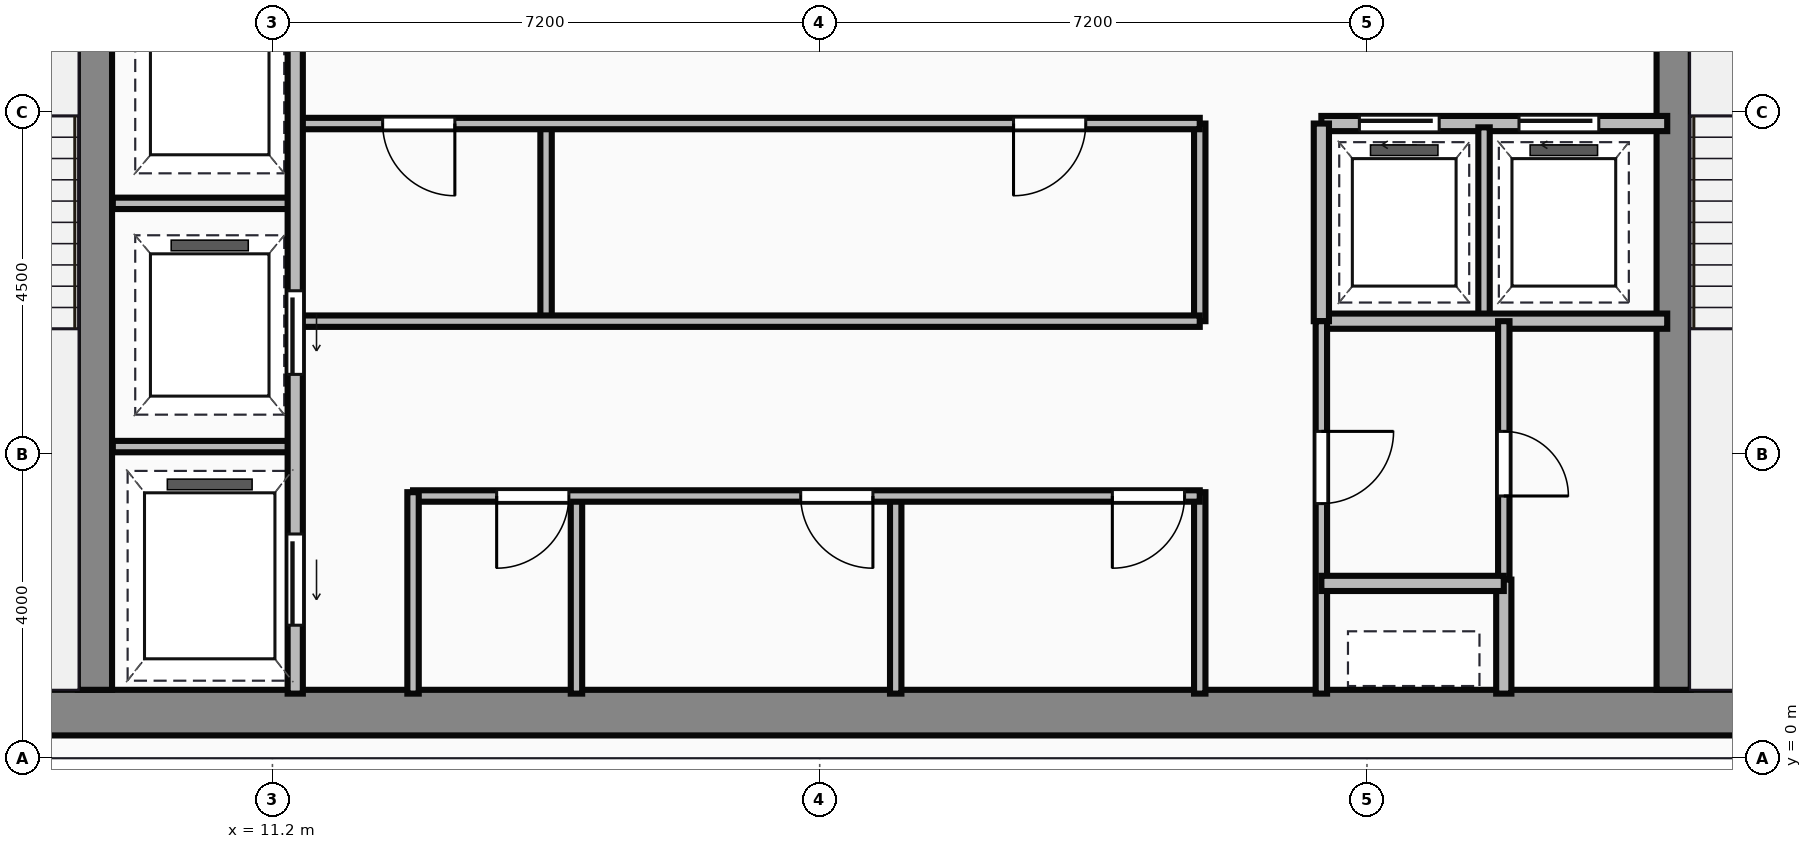
"""IFC4 building model, lengths in metres.
Left out: names, types, materials, properties, quantities, classifications, styles, units other than length and angle.
Written with IfcOpenShell. Run it as: python <this file> out.ifc"""

import sys

from ifc_helpers import new_model, si_unit, direction, frame, frame_2d, origin, place, context, subcontext, project, spatial, rectangle, extrude, source, transform, mapped, element, fill, save


model = new_model("IFC4")
c1 = context("Model", 3, precision=1e-05, world=origin(), true_north=direction((0.0, 1.0)))
c2 = subcontext(c1, "Body", "Model", "MODEL_VIEW")
j1 = project(units=[si_unit("LENGTHUNIT", "METRE"), si_unit("PLANEANGLEUNIT", "RADIAN")], contexts=[c1])
p1 = place(None, origin())
s1 = spatial("IfcSite", under=j1, at=p1, CompositionType="ELEMENT")
p2 = place(p1, origin())
s2 = spatial("IfcBuilding", under=s1, at=p2, CompositionType="ELEMENT")
p3 = place(p2, frame((0.0, 0.0, 192.25)))
s3 = spatial("IfcBuildingStorey", under=s2, at=p3, CompositionType="ELEMENT", Elevation=192.25)
m1 = source(origin(), c2, "Body", "SweptSolid", [
    extrude(rectangle(XDim=29.5, YDim=0.6, at=frame_2d((14.75, 0.0))), origin(), (0.0, 0.0, 1.0), 3.65),
])
p4 = place(p3, frame((4.5, 0.6, 0.0), z_axis=(0.0, 0.0, 1.0), x_axis=(1.0, 0.0, 0.0)))
e1 = element("IfcWall", 1, at=p4, inside=s3, PredefinedType="SHEAR", context=c2, shape_type="MappedRepresentation", body=[
    mapped(m1, transform((0.0, 0.0, 0.0))),
])
m2 = source(origin(), c2, "Body", "SweptSolid", [
    extrude(rectangle(XDim=12.5, YDim=0.45, at=frame_2d((6.25, 0.0))), origin(), (0.0, 0.0, 1.0), 3.65),
])
for number, where, z_axis, x_axis in (
    (2, (8.865, 0.9, 0.0), (0.0, 0.0, 1.0), (0.0, 1.0, 0.0)),
    (3, (29.635, 0.9, 0.0), (0.0, 0.0, 1.0), (0.0, 1.0, 0.0)),
):
    element("IfcWall", number, at=place(p3, frame(where, z_axis=z_axis, x_axis=x_axis)), inside=s3, PredefinedType="SHEAR", context=c2, shape_type="MappedRepresentation", body=[
        mapped(m2, transform((0.0, 0.0, 0.0))),
    ])
m3 = source(origin(), c2, "Body", "SweptSolid", [
    extrude(rectangle(XDim=9.6, YDim=0.2, at=frame_2d((4.8, 0.0))), origin(), (0.0, 0.0, 1.0), 3.4),
])
p5 = place(p3, frame((11.5, 0.85, 0.0), z_axis=(0.0, 0.0, 1.0), x_axis=(0.0, 1.0, 0.0)))
e4 = element("IfcWall", 4, at=p5, inside=s3, PredefinedType="PARTITIONING", context=c2, shape_type="MappedRepresentation", body=[
    mapped(m3, transform((0.0, 0.0, 0.0))),
])
p6 = place(p5, frame((4.2, 0.0, 0.0)))
e5 = element("IfcOpeningElement", 5, at=p6, cuts=e4, PredefinedType="OPENING", context=c2, shape_type="SweptSolid", body=[
    extrude(rectangle(XDim=1.1, YDim=2.15, at=frame_2d((0.55, 1.075))), frame((0.0, 0.11, 0.0), z_axis=(0.0, -1.0, 0.0), x_axis=(1.0, 0.0, 0.0)), (0.0, 0.0, 1.0), 0.22),
])
p7 = place(p5, frame((0.9, 0.0, 0.0)))
e6 = element("IfcOpeningElement", 6, at=p7, cuts=e4, PredefinedType="OPENING", context=c2, shape_type="SweptSolid", body=[
    extrude(rectangle(XDim=1.2, YDim=2.15, at=frame_2d((0.6, 1.075))), frame((0.0, 0.11, 0.0), z_axis=(0.0, -1.0, 0.0), x_axis=(1.0, 0.0, 0.0)), (0.0, 0.0, 1.0), 0.22),
])
m4 = source(origin(), c2, "Body", "SweptSolid", [
    extrude(rectangle(XDim=2.4, YDim=0.15, at=frame_2d((1.2, 0.0))), origin(), (0.0, 0.0, 1.0), 3.4),
])
for number, where, z_axis, x_axis in (
    (7, (9.1, 4.1, 0.0), (0.0, 0.0, 1.0), (1.0, 0.0, 0.0)),
    (8, (9.1, 7.3, 0.0), (0.0, 0.0, 1.0), (1.0, 0.0, 0.0)),
):
    element("IfcWall", number, at=place(p3, frame(where, z_axis=z_axis, x_axis=x_axis)), inside=s3, PredefinedType="PARTITIONING", context=c2, shape_type="MappedRepresentation", body=[
        mapped(m4, transform((0.0, 0.0, 0.0))),
    ])
m5 = source(origin(), c2, "Body", "SweptSolid", [
    extrude(rectangle(XDim=2.65, YDim=0.15, at=frame_2d((1.325, 0.0))), origin(), (0.0, 0.0, 1.0), 3.4),
])
p8 = place(p3, frame((13.05, 0.85, 0.0), z_axis=(0.0, 0.0, 1.0), x_axis=(0.0, 1.0, 0.0)))
e9 = element("IfcWall", 9, at=p8, inside=s3, PredefinedType="PARTITIONING", context=c2, shape_type="MappedRepresentation", body=[
    mapped(m5, transform((0.0, 0.0, 0.0))),
])
m6 = source(origin(), c2, "Body", "SweptSolid", [
    extrude(rectangle(XDim=10.35, YDim=0.15, at=frame_2d((5.175, 0.0))), origin(), (0.0, 0.0, 1.0), 3.4),
])
p9 = place(p3, frame((13.05, 3.45, 0.0), z_axis=(0.0, 0.0, 1.0), x_axis=(1.0, 0.0, 0.0)))
e10 = element("IfcWall", 10, at=p9, inside=s3, PredefinedType="PARTITIONING", context=c2, shape_type="MappedRepresentation", body=[
    mapped(m6, transform((0.0, 0.0, 0.0))),
])
p10 = place(p9, frame((1.1, 0.0, 0.0)))
e11 = element("IfcOpeningElement", 11, at=p10, cuts=e10, PredefinedType="OPENING", context=c2, shape_type="SweptSolid", body=[
    extrude(rectangle(XDim=0.95, YDim=2.15, at=frame_2d((0.475, 1.075))), frame((0.0, 0.085, 0.0), z_axis=(0.0, -1.0, 0.0), x_axis=(1.0, 0.0, 0.0)), (0.0, 0.0, 1.0), 0.17),
])
p11 = place(p9, frame((5.1, 0.0, 0.0)))
e12 = element("IfcOpeningElement", 12, at=p11, cuts=e10, PredefinedType="OPENING", context=c2, shape_type="SweptSolid", body=[
    extrude(rectangle(XDim=0.95, YDim=2.15, at=frame_2d((0.475, 1.075))), frame((0.0, 0.085, 0.0), z_axis=(0.0, -1.0, 0.0), x_axis=(1.0, 0.0, 0.0)), (0.0, 0.0, 1.0), 0.17),
])
p12 = place(p9, frame((9.2, 0.0, 0.0)))
e13 = element("IfcOpeningElement", 13, at=p12, cuts=e10, PredefinedType="OPENING", context=c2, shape_type="SweptSolid", body=[
    extrude(rectangle(XDim=0.95, YDim=2.15, at=frame_2d((0.475, 1.075))), frame((0.0, 0.085, 0.0), z_axis=(0.0, -1.0, 0.0), x_axis=(1.0, 0.0, 0.0)), (0.0, 0.0, 1.0), 0.17),
])
p13 = place(p3, frame((23.4, 0.85, 0.0), z_axis=(0.0, 0.0, 1.0), x_axis=(0.0, 1.0, 0.0)))
e14 = element("IfcWall", 14, at=p13, inside=s3, PredefinedType="PARTITIONING", context=c2, shape_type="MappedRepresentation", body=[
    mapped(m5, transform((0.0, 0.0, 0.0))),
])
m7 = source(origin(), c2, "Body", "SweptSolid", [
    extrude(rectangle(XDim=2.6, YDim=0.15, at=frame_2d((1.3, 0.0))), origin(), (0.0, 0.0, 1.0), 3.4),
])
for number, where, z_axis, x_axis in (
    (15, (15.2, 0.85, 0.0), (0.0, 0.0, 1.0), (0.0, 1.0, 0.0)),
    (16, (19.4, 0.85, 0.0), (0.0, 0.0, 1.0), (0.0, 1.0, 0.0)),
):
    element("IfcWall", number, at=place(p3, frame(where, z_axis=z_axis, x_axis=x_axis)), inside=s3, PredefinedType="PARTITIONING", context=c2, shape_type="MappedRepresentation", body=[
        mapped(m7, transform((0.0, 0.0, 0.0))),
    ])
m8 = source(origin(), c2, "Body", "SweptSolid", [
    extrude(rectangle(XDim=11.85, YDim=0.15, at=frame_2d((5.925, 0.0))), origin(), (0.0, 0.0, 1.0), 3.4),
])
p14 = place(p3, frame((11.55, 5.75, 0.0), z_axis=(0.0, 0.0, 1.0), x_axis=(1.0, 0.0, 0.0)))
e17 = element("IfcWall", 17, at=p14, inside=s3, PredefinedType="PARTITIONING", context=c2, shape_type="MappedRepresentation", body=[
    mapped(m8, transform((0.0, 0.0, 0.0))),
])
p15 = place(p3, frame((11.55, 8.35, 0.0), z_axis=(0.0, 0.0, 1.0), x_axis=(1.0, 0.0, 0.0)))
e18 = element("IfcWall", 18, at=p15, inside=s3, PredefinedType="PARTITIONING", context=c2, shape_type="MappedRepresentation", body=[
    mapped(m8, transform((0.0, 0.0, 0.0))),
])
p16 = place(p15, frame((1.1, 0.0, 0.0)))
e19 = element("IfcOpeningElement", 19, at=p16, cuts=e18, PredefinedType="OPENING", context=c2, shape_type="SweptSolid", body=[
    extrude(rectangle(XDim=0.95, YDim=2.15, at=frame_2d((0.475, 1.075))), frame((0.0, 0.085, 0.0), z_axis=(0.0, -1.0, 0.0), x_axis=(1.0, 0.0, 0.0)), (0.0, 0.0, 1.0), 0.17),
])
p17 = place(p15, frame((9.4, 0.0, 0.0)))
e20 = element("IfcOpeningElement", 20, at=p17, cuts=e18, PredefinedType="OPENING", context=c2, shape_type="SweptSolid", body=[
    extrude(rectangle(XDim=0.95, YDim=2.15, at=frame_2d((0.475, 1.075))), frame((0.0, 0.085, 0.0), z_axis=(0.0, -1.0, 0.0), x_axis=(1.0, 0.0, 0.0)), (0.0, 0.0, 1.0), 0.17),
])
m9 = source(origin(), c2, "Body", "SweptSolid", [
    extrude(rectangle(XDim=2.6, YDim=0.15, at=frame_2d((1.3, 0.0))), origin(), (0.0, 0.0, 1.0), 3.4),
])
p18 = place(p3, frame((23.4, 5.75, 0.0), z_axis=(0.0, 0.0, 1.0), x_axis=(0.0, 1.0, 0.0)))
e21 = element("IfcWall", 21, at=p18, inside=s3, PredefinedType="PARTITIONING", context=c2, shape_type="MappedRepresentation", body=[
    mapped(m9, transform((0.0, 0.0, 0.0))),
])
m10 = source(origin(), c2, "Body", "SweptSolid", [
    extrude(rectangle(XDim=2.5, YDim=0.15, at=frame_2d((1.25, 0.0))), origin(), (0.0, 0.0, 1.0), 3.4),
])
p19 = place(p3, frame((14.8, 5.8, 0.0), z_axis=(0.0, 0.0, 1.0), x_axis=(0.0, 1.0, 0.0)))
e22 = element("IfcWall", 22, at=p19, inside=s3, PredefinedType="PARTITIONING", context=c2, shape_type="MappedRepresentation", body=[
    mapped(m10, transform((0.0, 0.0, 0.0))),
])
m11 = source(origin(), c2, "Body", "SweptSolid", [
    extrude(rectangle(XDim=4.55, YDim=0.2, at=frame_2d((2.275, 0.0))), origin(), (0.0, 0.0, 1.0), 3.4),
])
p20 = place(p3, frame((25.0, 8.35, 0.0), z_axis=(0.0, 0.0, 1.0), x_axis=(1.0, 0.0, 0.0)))
e23 = element("IfcWall", 23, at=p20, inside=s3, PredefinedType="PARTITIONING", context=c2, shape_type="MappedRepresentation", body=[
    mapped(m11, transform((0.0, 0.0, 0.0))),
])
p21 = place(p20, frame((0.5, 0.0, 0.0)))
e24 = element("IfcOpeningElement", 24, at=p21, cuts=e23, PredefinedType="OPENING", context=c2, shape_type="SweptSolid", body=[
    extrude(rectangle(XDim=1.05, YDim=2.15, at=frame_2d((0.525, 1.075))), frame((0.0, 0.11, 0.0), z_axis=(0.0, -1.0, 0.0), x_axis=(1.0, 0.0, 0.0)), (0.0, 0.0, 1.0), 0.22),
])
p22 = place(p20, frame((2.6, 0.0, 0.0)))
e25 = element("IfcOpeningElement", 25, at=p22, cuts=e23, PredefinedType="OPENING", context=c2, shape_type="SweptSolid", body=[
    extrude(rectangle(XDim=1.05, YDim=2.15, at=frame_2d((0.525, 1.075))), frame((0.0, 0.11, 0.0), z_axis=(0.0, -1.0, 0.0), x_axis=(1.0, 0.0, 0.0)), (0.0, 0.0, 1.0), 0.22),
])
p23 = place(p3, frame((25.0, 5.75, 0.0), z_axis=(0.0, 0.0, 1.0), x_axis=(1.0, 0.0, 0.0)))
e26 = element("IfcWall", 26, at=p23, inside=s3, PredefinedType="PARTITIONING", context=c2, shape_type="MappedRepresentation", body=[
    mapped(m11, transform((0.0, 0.0, 0.0))),
])
m12 = source(origin(), c2, "Body", "SweptSolid", [
    extrude(rectangle(XDim=2.6, YDim=0.2, at=frame_2d((1.3, 0.0))), origin(), (0.0, 0.0, 1.0), 3.4),
])
p24 = place(p3, frame((25.0, 5.75, 0.0), z_axis=(0.0, 0.0, 1.0), x_axis=(0.0, 1.0, 0.0)))
e27 = element("IfcWall", 27, at=p24, inside=s3, PredefinedType="PARTITIONING", context=c2, shape_type="MappedRepresentation", body=[
    mapped(m12, transform((0.0, 0.0, 0.0))),
])
p25 = place(p3, frame((27.14, 5.8, 0.0), z_axis=(0.0, 0.0, 1.0), x_axis=(0.0, 1.0, 0.0)))
e28 = element("IfcWall", 28, at=p25, inside=s3, PredefinedType="PARTITIONING", context=c2, shape_type="MappedRepresentation", body=[
    mapped(m10, transform((0.0, 0.0, 0.0))),
])
m13 = source(origin(), c2, "Body", "SweptSolid", [
    extrude(rectangle(XDim=4.9, YDim=0.15, at=frame_2d((2.45, 0.0))), origin(), (0.0, 0.0, 1.0), 3.4),
])
p26 = place(p3, frame((25.0, 0.85, 0.0), z_axis=(0.0, 0.0, 1.0), x_axis=(0.0, 1.0, 0.0)))
e29 = element("IfcWall", 29, at=p26, inside=s3, PredefinedType="PARTITIONING", context=c2, shape_type="MappedRepresentation", body=[
    mapped(m13, transform((0.0, 0.0, 0.0))),
])
p27 = place(p26, frame((2.5, 0.0, 0.0)))
e30 = element("IfcOpeningElement", 30, at=p27, cuts=e29, PredefinedType="OPENING", context=c2, shape_type="SweptSolid", body=[
    extrude(rectangle(XDim=0.95, YDim=2.15, at=frame_2d((0.475, 1.075))), frame((0.0, 0.085, 0.0), z_axis=(0.0, -1.0, 0.0), x_axis=(1.0, 0.0, 0.0)), (0.0, 0.0, 1.0), 0.17),
])
m14 = source(origin(), c2, "Body", "SweptSolid", [
    extrude(rectangle(XDim=2.4, YDim=0.2, at=frame_2d((1.2, 0.0))), origin(), (0.0, 0.0, 1.0), 3.4),
])
p28 = place(p3, frame((25.0, 2.3, 0.0), z_axis=(0.0, 0.0, 1.0), x_axis=(1.0, 0.0, 0.0)))
e31 = element("IfcWall", 31, at=p28, inside=s3, PredefinedType="PARTITIONING", context=c2, shape_type="MappedRepresentation", body=[
    mapped(m14, transform((0.0, 0.0, 0.0))),
])
m15 = source(origin(), c2, "Body", "SweptSolid", [
    extrude(rectangle(XDim=1.5, YDim=0.2, at=frame_2d((0.75, 0.0))), origin(), (0.0, 0.0, 1.0), 3.4),
])
p29 = place(p3, frame((27.4, 0.85, 0.0), z_axis=(0.0, 0.0, 1.0), x_axis=(0.0, 1.0, 0.0)))
e32 = element("IfcWall", 32, at=p29, inside=s3, PredefinedType="PARTITIONING", context=c2, shape_type="MappedRepresentation", body=[
    mapped(m15, transform((0.0, 0.0, 0.0))),
])
m16 = source(origin(), c2, "Body", "SweptSolid", [
    extrude(rectangle(XDim=3.4, YDim=0.15, at=frame_2d((1.7, 0.0))), origin(), (0.0, 0.0, 1.0), 3.4),
])
p30 = place(p3, frame((27.4, 2.35, 0.0), z_axis=(0.0, 0.0, 1.0), x_axis=(0.0, 1.0, 0.0)))
e33 = element("IfcWall", 33, at=p30, inside=s3, PredefinedType="PARTITIONING", context=c2, shape_type="MappedRepresentation", body=[
    mapped(m16, transform((0.0, 0.0, 0.0))),
])
p31 = place(p30, frame((1.1, 0.0, 0.0)))
e34 = element("IfcOpeningElement", 34, at=p31, cuts=e33, PredefinedType="OPENING", context=c2, shape_type="SweptSolid", body=[
    extrude(rectangle(XDim=0.85, YDim=2.1, at=frame_2d((0.425, 1.05))), frame((0.0, 0.085, 0.0), z_axis=(0.0, -1.0, 0.0), x_axis=(1.0, 0.0, 0.0)), (0.0, 0.0, 1.0), 0.17),
])
m17 = source(origin(), c2, "Body", "SweptSolid", [
    extrude(rectangle(XDim=1.1, YDim=2.15, at=frame_2d((0.55, 1.075))), frame((0.0, 0.025, 0.0), z_axis=(0.0, -1.0, 0.0), x_axis=(1.0, 0.0, 0.0)), (0.0, 0.0, 1.0), 0.05),
])
p32 = place(p6, frame((1.1, 0.0, 0.0), z_axis=(0.0, 0.0, 1.0), x_axis=(-1.0, 0.0, 0.0)))
e35 = element("IfcDoor", 35, at=p32, inside=s3, OperationType="SLIDING_TO_LEFT", PredefinedType="DOOR", context=c2, shape_type="MappedRepresentation", body=[
    mapped(m17, transform((0.0, 0.0, 0.0))),
])
fill(e5, e35)
m18 = source(origin(), c2, "Body", "SweptSolid", [
    extrude(rectangle(XDim=1.2, YDim=2.15, at=frame_2d((0.6, 1.075))), frame((0.0, 0.025, 0.0), z_axis=(0.0, -1.0, 0.0), x_axis=(1.0, 0.0, 0.0)), (0.0, 0.0, 1.0), 0.05),
])
p33 = place(p7, frame((1.2, 0.0, 0.0), z_axis=(0.0, 0.0, 1.0), x_axis=(-1.0, 0.0, 0.0)))
e36 = element("IfcDoor", 36, at=p33, inside=s3, OperationType="SLIDING_TO_LEFT", PredefinedType="DOOR", context=c2, shape_type="MappedRepresentation", body=[
    mapped(m18, transform((0.0, 0.0, 0.0))),
])
fill(e6, e36)
m19 = source(origin(), c2, "Body", "SweptSolid", [
    extrude(rectangle(XDim=0.95, YDim=2.15, at=frame_2d((0.475, 1.075))), frame((0.0, 0.025, 0.0), z_axis=(0.0, -1.0, 0.0), x_axis=(1.0, 0.0, 0.0)), (0.0, 0.0, 1.0), 0.05),
])
p34 = place(p10, origin())
e37 = element("IfcDoor", 37, at=p34, inside=s3, OperationType="SINGLE_SWING_LEFT", PredefinedType="DOOR", context=c2, shape_type="MappedRepresentation", body=[
    mapped(m19, transform((0.0, 0.0, 0.0))),
])
fill(e11, e37)
p35 = place(p11, origin())
e38 = element("IfcDoor", 38, at=p35, inside=s3, OperationType="SINGLE_SWING_RIGHT", PredefinedType="DOOR", context=c2, shape_type="MappedRepresentation", body=[
    mapped(m19, transform((0.0, 0.0, 0.0))),
])
fill(e12, e38)
p36 = place(p12, origin())
e39 = element("IfcDoor", 39, at=p36, inside=s3, OperationType="SINGLE_SWING_LEFT", PredefinedType="DOOR", context=c2, shape_type="MappedRepresentation", body=[
    mapped(m19, transform((0.0, 0.0, 0.0))),
])
fill(e13, e39)
p37 = place(p16, origin())
e40 = element("IfcDoor", 40, at=p37, inside=s3, OperationType="SINGLE_SWING_RIGHT", PredefinedType="DOOR", context=c2, shape_type="MappedRepresentation", body=[
    mapped(m19, transform((0.0, 0.0, 0.0))),
])
fill(e19, e40)
p38 = place(p17, origin())
e41 = element("IfcDoor", 41, at=p38, inside=s3, OperationType="SINGLE_SWING_LEFT", PredefinedType="DOOR", context=c2, shape_type="MappedRepresentation", body=[
    mapped(m19, transform((0.0, 0.0, 0.0))),
])
fill(e20, e41)
m20 = source(origin(), c2, "Body", "SweptSolid", [
    extrude(rectangle(XDim=1.05, YDim=2.15, at=frame_2d((0.525, 1.075))), frame((0.0, 0.025, 0.0), z_axis=(0.0, -1.0, 0.0), x_axis=(1.0, 0.0, 0.0)), (0.0, 0.0, 1.0), 0.05),
])
p39 = place(p21, origin())
e42 = element("IfcDoor", 42, at=p39, inside=s3, OperationType="SLIDING_TO_LEFT", PredefinedType="DOOR", context=c2, shape_type="MappedRepresentation", body=[
    mapped(m20, transform((0.0, 0.0, 0.0))),
])
fill(e24, e42)
p40 = place(p22, origin())
e43 = element("IfcDoor", 43, at=p40, inside=s3, OperationType="SLIDING_TO_LEFT", PredefinedType="DOOR", context=c2, shape_type="MappedRepresentation", body=[
    mapped(m20, transform((0.0, 0.0, 0.0))),
])
fill(e25, e43)
p41 = place(p27, origin())
e44 = element("IfcDoor", 44, at=p41, inside=s3, OperationType="SINGLE_SWING_RIGHT", PredefinedType="DOOR", context=c2, shape_type="MappedRepresentation", body=[
    mapped(m19, transform((0.0, 0.0, 0.0))),
])
fill(e30, e44)
m21 = source(origin(), c2, "Body", "SweptSolid", [
    extrude(rectangle(XDim=0.85, YDim=2.1, at=frame_2d((0.425, 1.05))), frame((0.0, 0.025, 0.0), z_axis=(0.0, -1.0, 0.0), x_axis=(1.0, 0.0, 0.0)), (0.0, 0.0, 1.0), 0.05),
])
p42 = place(p31, frame((0.85, 0.0, 0.0), z_axis=(0.0, 0.0, 1.0), x_axis=(-1.0, 0.0, 0.0)))
e45 = element("IfcDoor", 45, at=p42, inside=s3, OperationType="SINGLE_SWING_LEFT", PredefinedType="DOOR", context=c2, shape_type="MappedRepresentation", body=[
    mapped(m21, transform((0.0, 0.0, 0.0))),
])
fill(e34, e45)
save(model, sys.argv[1])
